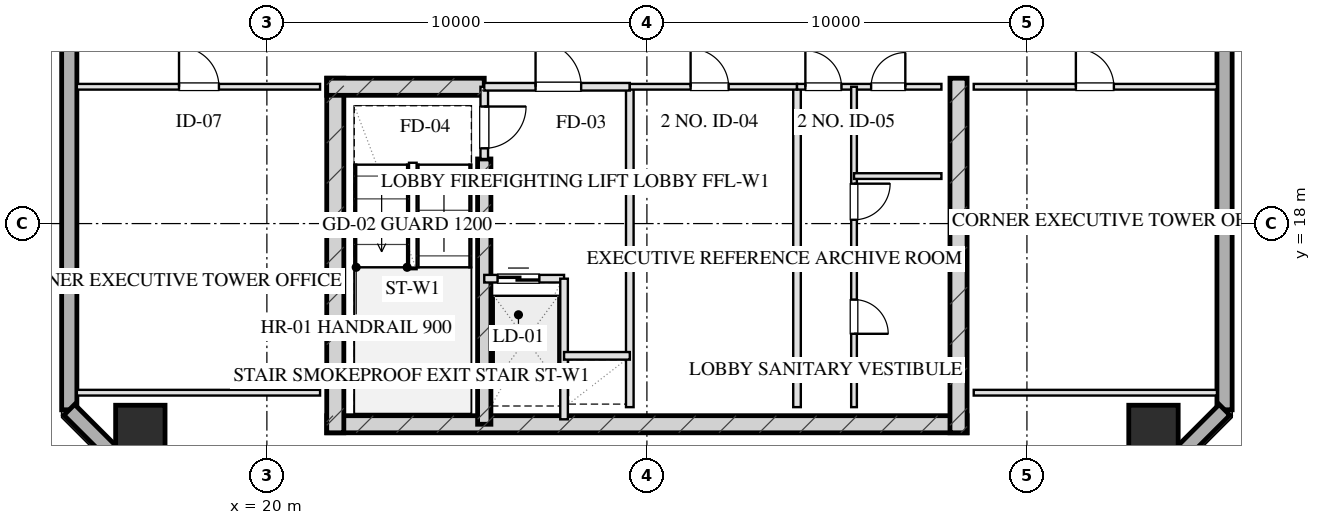
"""IFC4 building model, lengths in metres.
Left out: names, types, materials, properties, quantities, classifications, styles, units other than length and angle.
Written with IfcOpenShell. Run it as: python <this file> out.ifc"""

import sys

from ifc_helpers import new_model, si_unit, direction, frame, frame_2d, origin, origin_2d, place, context, subcontext, project, spatial, rectangle, hollow_rectangle, extrude, element, fill, save


model = new_model("IFC4")
c1 = context("Model", 3, precision=1e-05, world=origin(), true_north=direction((0.0, 1.0)))
c2 = subcontext(c1, "Body", "Model", "MODEL_VIEW")
j1 = project(units=[si_unit("LENGTHUNIT", "METRE"), si_unit("PLANEANGLEUNIT", "RADIAN")], contexts=[c1])
p1 = place(None, origin())
s1 = spatial("IfcSite", under=j1, at=p1, CompositionType="ELEMENT")
p2 = place(p1, origin())
s2 = spatial("IfcBuilding", under=s1, at=p2, CompositionType="ELEMENT")
p3 = place(p2, frame((0.0, 0.0, 226.55)))
s3 = spatial("IfcBuildingStorey", under=s2, at=p3, CompositionType="ELEMENT", Elevation=226.55)
p4 = place(p3, frame((21.575, 12.72, 0.0), z_axis=(0.0, 0.0, 1.0), x_axis=(1.0, 0.0, 0.0)))
e1 = element("IfcWall", 1, at=p4, inside=s3, PredefinedType="SHEAR", context=c2, shape_type="SweptSolid", body=[
    extrude(rectangle(XDim=16.85, YDim=0.45, at=frame_2d((8.425, 0.0))), origin(), (0.0, 0.0, 1.0), 3.45),
])
for number, where, z_axis, x_axis in (
    (2, (21.8, 21.825, 0.0), (0.0, 0.0, 1.0), (0.0, -1.0, 0.0)),
    (3, (38.2, 21.825, 0.0), (0.0, 0.0, 1.0), (0.0, -1.0, 0.0)),
):
    element("IfcWall", number, at=place(p3, frame(where, z_axis=z_axis, x_axis=x_axis)), inside=s3, PredefinedType="SHEAR", context=c2, shape_type="SweptSolid", body=[
        extrude(rectangle(XDim=9.33, YDim=0.45, at=frame_2d((4.665, 0.0))), origin(), (0.0, 0.0, 1.0), 3.45),
    ])
p5 = place(p3, frame((25.72, 19.7, 0.0), z_axis=(0.0, 0.0, 1.0), x_axis=(0.0, -1.0, 0.0)))
e4 = element("IfcWall", 4, at=p5, inside=s3, PredefinedType="SHEAR", context=c2, shape_type="SweptSolid", body=[
    extrude(rectangle(XDim=6.98, YDim=0.35, at=frame_2d((3.49, 0.0))), origin(), (0.0, 0.0, 1.0), 3.45),
])
p6 = place(p3, frame((21.575, 21.6, 0.0), z_axis=(0.0, 0.0, 1.0), x_axis=(1.0, 0.0, 0.0)))
e5 = element("IfcWall", 5, at=p6, inside=s3, PredefinedType="SHEAR", context=c2, shape_type="SweptSolid", body=[
    extrude(rectangle(XDim=4.145, YDim=0.45, at=frame_2d((2.073, 0.0))), origin(), (0.0, 0.0, 1.0), 3.45),
])
for number, where, z_axis, x_axis in (
    (6, (16.67, 12.57, 0.0), (0.0, 0.0, 1.0), (1.0, 0.0, 0.0)),
    (7, (43.33, 12.57, 0.0), (0.0, 0.0, 1.0), (1.0, 0.0, 0.0)),
):
    element("IfcColumn", number, at=place(p3, frame(where, z_axis=z_axis, x_axis=x_axis)), inside=s3, PredefinedType="COLUMN", context=c2, shape_type="SweptSolid", body=[
        extrude(hollow_rectangle(XDim=1.3, YDim=1.3, WallThickness=0.045, at=origin_2d()), origin(), (0.0, 0.0, 1.0), 3.451),
    ])
p7 = place(p3, frame((14.8, 13.1, 0.0), z_axis=(0.0, 0.0, 1.0), x_axis=(0.0, 1.0, 0.0)))
e8 = element("IfcWall", 8, at=p7, inside=s3, PredefinedType="SOLIDWALL", context=c2, shape_type="SweptSolid", body=[
    extrude(rectangle(XDim=41.8, YDim=0.4, at=frame_2d((20.9, 0.0))), origin(), (0.0, 0.0, 1.0), 2.55),
])
p8 = place(p7, frame((13.525, 0.0, 0.75)))
e9 = element("IfcOpeningElement", 9, at=p8, cuts=e8, PredefinedType="OPENING", context=c2, shape_type="SweptSolid", body=[
    extrude(rectangle(XDim=1.95, YDim=1.4, at=frame_2d((0.975, 0.7))), frame((0.0, 0.21, 0.0), z_axis=(0.0, -1.0, 0.0), x_axis=(1.0, 0.0, 0.0)), (0.0, 0.0, 1.0), 0.42),
])
p9 = place(p7, frame((17.325, 0.0, 0.75)))
e10 = element("IfcOpeningElement", 10, at=p9, cuts=e8, PredefinedType="OPENING", context=c2, shape_type="SweptSolid", body=[
    extrude(rectangle(XDim=1.95, YDim=1.4, at=frame_2d((0.975, 0.7))), frame((0.0, 0.21, 0.0), z_axis=(0.0, -1.0, 0.0), x_axis=(1.0, 0.0, 0.0)), (0.0, 0.0, 1.0), 0.42),
])
p10 = place(p7, frame((23.2, 0.0, 0.0)))
e11 = element("IfcOpeningElement", 11, at=p10, cuts=e8, PredefinedType="OPENING", context=c2, shape_type="SweptSolid", body=[
    extrude(rectangle(XDim=1.1, YDim=2.15, at=frame_2d((0.55, 1.075))), frame((0.0, 0.21, 0.0), z_axis=(0.0, -1.0, 0.0), x_axis=(1.0, 0.0, 0.0)), (0.0, 0.0, 1.0), 0.42),
])
p11 = place(p3, frame((45.2, 54.9, 0.0), z_axis=(0.0, 0.0, 1.0), x_axis=(0.0, -1.0, 0.0)))
e12 = element("IfcWall", 12, at=p11, inside=s3, PredefinedType="SOLIDWALL", context=c2, shape_type="SweptSolid", body=[
    extrude(rectangle(XDim=41.8, YDim=0.4, at=frame_2d((20.9, 0.0))), origin(), (0.0, 0.0, 1.0), 2.55),
])
p12 = place(p11, frame((26.325, 0.0, 0.75)))
e13 = element("IfcOpeningElement", 13, at=p12, cuts=e12, PredefinedType="OPENING", context=c2, shape_type="SweptSolid", body=[
    extrude(rectangle(XDim=1.95, YDim=1.4, at=frame_2d((0.975, 0.7))), frame((0.0, 0.21, 0.0), z_axis=(0.0, -1.0, 0.0), x_axis=(1.0, 0.0, 0.0)), (0.0, 0.0, 1.0), 0.42),
])
p13 = place(p11, frame((22.525, 0.0, 0.75)))
e14 = element("IfcOpeningElement", 14, at=p13, cuts=e12, PredefinedType="OPENING", context=c2, shape_type="SweptSolid", body=[
    extrude(rectangle(XDim=1.95, YDim=1.4, at=frame_2d((0.975, 0.7))), frame((0.0, 0.21, 0.0), z_axis=(0.0, -1.0, 0.0), x_axis=(1.0, 0.0, 0.0)), (0.0, 0.0, 1.0), 0.42),
])
p14 = place(p11, frame((17.5, 0.0, 0.0)))
e15 = element("IfcOpeningElement", 15, at=p14, cuts=e12, PredefinedType="OPENING", context=c2, shape_type="SweptSolid", body=[
    extrude(rectangle(XDim=1.1, YDim=2.15, at=frame_2d((0.55, 1.075))), frame((0.0, 0.21, 0.0), z_axis=(0.0, -1.0, 0.0), x_axis=(1.0, 0.0, 0.0)), (0.0, 0.0, 1.0), 0.42),
])
for number, where, z_axis, x_axis in (
    (16, (45.2, 13.1, 0.0), (0.0, 0.0, 1.0), (-0.707, -0.707, 0.0)),
    (17, (17.2, 10.7, 0.0), (0.0, 0.0, 1.0), (-0.707, 0.707, 0.0)),
):
    element("IfcWall", number, at=place(p3, frame(where, z_axis=z_axis, x_axis=x_axis)), inside=s3, PredefinedType="SOLIDWALL", context=c2, shape_type="SweptSolid", body=[
        extrude(rectangle(XDim=3.394, YDim=0.4, at=frame_2d((1.697, 0.0))), origin(), (0.0, 0.0, 1.0), 2.55),
    ])
p15 = place(p3, frame((25.72, 21.6, 0.0), z_axis=(0.0, 0.0, 1.0), x_axis=(0.0, -1.0, 0.0)))
e18 = element("IfcWall", 18, at=p15, inside=s3, PredefinedType="PARTITIONING", context=c2, shape_type="SweptSolid", body=[
    extrude(rectangle(XDim=1.9, YDim=0.2, at=frame_2d((0.95, 0.0))), origin(), (0.0, 0.0, 1.0), 3.155),
])
p16 = place(p15, frame((0.52, 0.0, 0.0)))
e19 = element("IfcOpeningElement", 19, at=p16, cuts=e18, PredefinedType="OPENING", context=c2, shape_type="SweptSolid", body=[
    extrude(rectangle(XDim=1.1, YDim=2.05, at=frame_2d((0.55, 1.025))), frame((0.0, 0.11, 0.0), z_axis=(0.0, -1.0, 0.0), x_axis=(1.0, 0.0, 0.0)), (0.0, 0.0, 1.0), 0.22),
])
p17 = place(p3, frame((29.55, 21.6, 0.0), z_axis=(0.0, 0.0, 1.0), x_axis=(0.0, -1.0, 0.0)))
e20 = element("IfcWall", 20, at=p17, inside=s3, PredefinedType="PARTITIONING", context=c2, shape_type="SweptSolid", body=[
    extrude(rectangle(XDim=8.43, YDim=0.2, at=frame_2d((4.215, 0.0))), origin(), (0.0, 0.0, 1.0), 3.155),
])
p18 = place(p3, frame((25.72, 21.6, 0.0), z_axis=(0.0, 0.0, 1.0), x_axis=(1.0, 0.0, 0.0)))
e21 = element("IfcWall", 21, at=p18, inside=s3, PredefinedType="PARTITIONING", context=c2, shape_type="SweptSolid", body=[
    extrude(rectangle(XDim=3.83, YDim=0.2, at=frame_2d((1.915, 0.0))), origin(), (0.0, 0.0, 1.0), 3.155),
])
p19 = place(p18, frame((1.35, 0.0, 0.0)))
e22 = element("IfcOpeningElement", 22, at=p19, cuts=e21, PredefinedType="OPENING", context=c2, shape_type="SweptSolid", body=[
    extrude(rectangle(XDim=1.2, YDim=2.05, at=frame_2d((0.6, 1.025))), frame((0.0, 0.11, 0.0), z_axis=(0.0, -1.0, 0.0), x_axis=(1.0, 0.0, 0.0)), (0.0, 0.0, 1.0), 0.22),
])
p20 = place(p3, frame((25.72, 16.55, 0.0), z_axis=(0.0, 0.0, 1.0), x_axis=(1.0, 0.0, 0.0)))
e23 = element("IfcWall", 23, at=p20, inside=s3, PredefinedType="PARTITIONING", context=c2, shape_type="SweptSolid", body=[
    extrude(rectangle(XDim=2.1, YDim=0.2, at=frame_2d((1.05, 0.0))), origin(), (0.0, 0.0, 1.0), 3.155),
])
p21 = place(p20, frame((0.35, 0.0, 0.0)))
e24 = element("IfcOpeningElement", 24, at=p21, cuts=e23, PredefinedType="OPENING", context=c2, shape_type="SweptSolid", body=[
    extrude(rectangle(XDim=1.1, YDim=2.05, at=frame_2d((0.55, 1.025))), frame((0.0, 0.11, 0.0), z_axis=(0.0, -1.0, 0.0), x_axis=(1.0, 0.0, 0.0)), (0.0, 0.0, 1.0), 0.22),
])
p22 = place(p3, frame((27.82, 16.55, 0.0), z_axis=(0.0, 0.0, 1.0), x_axis=(0.0, -1.0, 0.0)))
e25 = element("IfcWall", 25, at=p22, inside=s3, PredefinedType="PARTITIONING", context=c2, shape_type="SweptSolid", body=[
    extrude(rectangle(XDim=3.7, YDim=0.2, at=frame_2d((1.85, 0.0))), origin(), (0.0, 0.0, 1.0), 3.155),
])
p23 = place(p3, frame((27.82, 14.52, 0.0), z_axis=(0.0, 0.0, 1.0), x_axis=(1.0, 0.0, 0.0)))
e26 = element("IfcWall", 26, at=p23, inside=s3, PredefinedType="PARTITIONING", context=c2, shape_type="SweptSolid", body=[
    extrude(rectangle(XDim=1.73, YDim=0.2, at=frame_2d((0.865, 0.0))), origin(), (0.0, 0.0, 1.0), 3.155),
])
p24 = place(p3, frame((33.95, 21.6, 0.0), z_axis=(0.0, 0.0, 1.0), x_axis=(0.0, -1.0, 0.0)))
e27 = element("IfcWall", 27, at=p24, inside=s3, PredefinedType="PARTITIONING", context=c2, shape_type="SweptSolid", body=[
    extrude(rectangle(XDim=8.43, YDim=0.2, at=frame_2d((4.215, 0.0))), origin(), (0.0, 0.0, 1.0), 3.155),
])
p25 = place(p3, frame((29.55, 21.6, 0.0), z_axis=(0.0, 0.0, 1.0), x_axis=(1.0, 0.0, 0.0)))
e28 = element("IfcWall", 28, at=p25, inside=s3, PredefinedType="PARTITIONING", context=c2, shape_type="SweptSolid", body=[
    extrude(rectangle(XDim=4.4, YDim=0.15, at=frame_2d((2.2, 0.0))), origin(), (0.0, 0.0, 1.0), 3.155),
])
p26 = place(p25, frame((1.6, 0.0, 0.0)))
e29 = element("IfcOpeningElement", 29, at=p26, cuts=e28, PredefinedType="OPENING", context=c2, shape_type="SweptSolid", body=[
    extrude(rectangle(XDim=1.0, YDim=2.05, at=frame_2d((0.5, 1.025))), frame((0.0, 0.085, 0.0), z_axis=(0.0, -1.0, 0.0), x_axis=(1.0, 0.0, 0.0)), (0.0, 0.0, 1.0), 0.17),
])
p27 = place(p3, frame((33.95, 21.6, 0.0), z_axis=(0.0, 0.0, 1.0), x_axis=(1.0, 0.0, 0.0)))
e30 = element("IfcWall", 30, at=p27, inside=s3, PredefinedType="PARTITIONING", context=c2, shape_type="SweptSolid", body=[
    extrude(rectangle(XDim=3.8, YDim=0.15, at=frame_2d((1.9, 0.0))), origin(), (0.0, 0.0, 1.0), 3.155),
])
p28 = place(p27, frame((0.22, 0.0, 0.0)))
e31 = element("IfcOpeningElement", 31, at=p28, cuts=e30, PredefinedType="OPENING", context=c2, shape_type="SweptSolid", body=[
    extrude(rectangle(XDim=0.95, YDim=2.05, at=frame_2d((0.475, 1.025))), frame((0.0, 0.085, 0.0), z_axis=(0.0, -1.0, 0.0), x_axis=(1.0, 0.0, 0.0)), (0.0, 0.0, 1.0), 0.17),
])
p29 = place(p27, frame((1.95, 0.0, 0.0)))
e32 = element("IfcOpeningElement", 32, at=p29, cuts=e30, PredefinedType="OPENING", context=c2, shape_type="SweptSolid", body=[
    extrude(rectangle(XDim=0.9, YDim=2.05, at=frame_2d((0.45, 1.025))), frame((0.0, 0.085, 0.0), z_axis=(0.0, -1.0, 0.0), x_axis=(1.0, 0.0, 0.0)), (0.0, 0.0, 1.0), 0.17),
])
p30 = place(p3, frame((35.45, 21.6, 0.0), z_axis=(0.0, 0.0, 1.0), x_axis=(0.0, -1.0, 0.0)))
e33 = element("IfcWall", 33, at=p30, inside=s3, PredefinedType="PARTITIONING", context=c2, shape_type="SweptSolid", body=[
    extrude(rectangle(XDim=8.43, YDim=0.15, at=frame_2d((4.215, 0.0))), origin(), (0.0, 0.0, 1.0), 2.795),
])
p31 = place(p30, frame((2.55, 0.0, 0.0)))
e34 = element("IfcOpeningElement", 34, at=p31, cuts=e33, PredefinedType="OPENING", context=c2, shape_type="SweptSolid", body=[
    extrude(rectangle(XDim=0.95, YDim=2.05, at=frame_2d((0.475, 1.025))), frame((0.0, 0.085, 0.0), z_axis=(0.0, -1.0, 0.0), x_axis=(1.0, 0.0, 0.0)), (0.0, 0.0, 1.0), 0.17),
])
p32 = place(p30, frame((5.6, 0.0, 0.0)))
e35 = element("IfcOpeningElement", 35, at=p32, cuts=e33, PredefinedType="OPENING", context=c2, shape_type="SweptSolid", body=[
    extrude(rectangle(XDim=0.9, YDim=2.05, at=frame_2d((0.45, 1.025))), frame((0.0, 0.085, 0.0), z_axis=(0.0, -1.0, 0.0), x_axis=(1.0, 0.0, 0.0)), (0.0, 0.0, 1.0), 0.17),
])
for number, where, z_axis, x_axis in (
    (36, (35.45, 17.2, 0.0), (0.0, 0.0, 1.0), (1.0, 0.0, 0.0)),
    (37, (35.45, 19.25, 0.0), (0.0, 0.0, 1.0), (1.0, 0.0, 0.0)),
):
    element("IfcWall", number, at=place(p3, frame(where, z_axis=z_axis, x_axis=x_axis)), inside=s3, PredefinedType="PARTITIONING", context=c2, shape_type="SweptSolid", body=[
        extrude(rectangle(XDim=2.3, YDim=0.15, at=frame_2d((1.15, 0.0))), origin(), (0.0, 0.0, 1.0), 3.155),
    ])
p33 = place(p3, frame((15.0, 13.55, 0.0), z_axis=(0.0, 0.0, 1.0), x_axis=(1.0, 0.0, 0.0)))
e38 = element("IfcWall", 38, at=p33, inside=s3, PredefinedType="PARTITIONING", context=c2, shape_type="SweptSolid", body=[
    extrude(rectangle(XDim=6.4, YDim=0.15, at=frame_2d((3.2, 0.0))), origin(), (0.0, 0.0, 1.0), 3.155),
])
p34 = place(p3, frame((15.0, 21.6, 0.0), z_axis=(0.0, 0.0, 1.0), x_axis=(1.0, 0.0, 0.0)))
e39 = element("IfcWall", 39, at=p34, inside=s3, PredefinedType="PARTITIONING", context=c2, shape_type="SweptSolid", body=[
    extrude(rectangle(XDim=6.4, YDim=0.15, at=frame_2d((3.2, 0.0))), origin(), (0.0, 0.0, 1.0), 3.155),
])
p35 = place(p34, frame((2.688, 0.0, 0.0)))
e40 = element("IfcOpeningElement", 40, at=p35, cuts=e39, PredefinedType="OPENING", context=c2, shape_type="SweptSolid", body=[
    extrude(rectangle(XDim=1.05, YDim=2.05, at=frame_2d((0.525, 1.025))), frame((0.0, 0.085, 0.0), z_axis=(0.0, -1.0, 0.0), x_axis=(1.0, 0.0, 0.0)), (0.0, 0.0, 1.0), 0.17),
])
p36 = place(p3, frame((38.6, 13.55, 0.0), z_axis=(0.0, 0.0, 1.0), x_axis=(1.0, 0.0, 0.0)))
e41 = element("IfcWall", 41, at=p36, inside=s3, PredefinedType="PARTITIONING", context=c2, shape_type="SweptSolid", body=[
    extrude(rectangle(XDim=6.4, YDim=0.15, at=frame_2d((3.2, 0.0))), origin(), (0.0, 0.0, 1.0), 3.155),
])
p37 = place(p3, frame((38.6, 21.6, 0.0), z_axis=(0.0, 0.0, 1.0), x_axis=(1.0, 0.0, 0.0)))
e42 = element("IfcWall", 42, at=p37, inside=s3, PredefinedType="PARTITIONING", context=c2, shape_type="SweptSolid", body=[
    extrude(rectangle(XDim=6.4, YDim=0.15, at=frame_2d((3.2, 0.0))), origin(), (0.0, 0.0, 1.0), 3.155),
])
p38 = place(p37, frame((2.688, 0.0, 0.0)))
e43 = element("IfcOpeningElement", 43, at=p38, cuts=e42, PredefinedType="OPENING", context=c2, shape_type="SweptSolid", body=[
    extrude(rectangle(XDim=1.0, YDim=2.05, at=frame_2d((0.5, 1.025))), frame((0.0, 0.085, 0.0), z_axis=(0.0, -1.0, 0.0), x_axis=(1.0, 0.0, 0.0)), (0.0, 0.0, 1.0), 0.17),
])
p39 = place(p16, origin())
e44 = element("IfcDoor", 44, at=p39, inside=s3, OperationType="SINGLE_SWING_LEFT", PredefinedType="DOOR", context=c2, shape_type="SweptSolid", body=[
    extrude(rectangle(XDim=1.1, YDim=2.05, at=frame_2d((0.55, 1.025))), frame((0.0, 0.025, 0.0), z_axis=(0.0, -1.0, 0.0), x_axis=(1.0, 0.0, 0.0)), (0.0, 0.0, 1.0), 0.05),
])
fill(e19, e44)
p40 = place(p19, origin())
e45 = element("IfcDoor", 45, at=p40, inside=s3, OperationType="SINGLE_SWING_LEFT", PredefinedType="DOOR", context=c2, shape_type="SweptSolid", body=[
    extrude(rectangle(XDim=1.2, YDim=2.05, at=frame_2d((0.6, 1.025))), frame((0.0, 0.025, 0.0), z_axis=(0.0, -1.0, 0.0), x_axis=(1.0, 0.0, 0.0)), (0.0, 0.0, 1.0), 0.05),
])
fill(e22, e45)
p41 = place(p21, origin())
e46 = element("IfcDoor", 46, at=p41, inside=s3, OperationType="DOUBLE_DOOR_SLIDING", PredefinedType="DOOR", context=c2, shape_type="SweptSolid", body=[
    extrude(rectangle(XDim=1.1, YDim=2.05, at=frame_2d((0.55, 1.025))), frame((0.0, 0.025, 0.0), z_axis=(0.0, -1.0, 0.0), x_axis=(1.0, 0.0, 0.0)), (0.0, 0.0, 1.0), 0.05),
])
fill(e24, e46)
p42 = place(p26, origin())
e47 = element("IfcDoor", 47, at=p42, inside=s3, OperationType="SINGLE_SWING_LEFT", PredefinedType="DOOR", context=c2, shape_type="SweptSolid", body=[
    extrude(rectangle(XDim=1.0, YDim=2.05, at=frame_2d((0.5, 1.025))), frame((0.0, 0.025, 0.0), z_axis=(0.0, -1.0, 0.0), x_axis=(1.0, 0.0, 0.0)), (0.0, 0.0, 1.0), 0.05),
])
fill(e29, e47)
p43 = place(p28, origin())
e48 = element("IfcDoor", 48, at=p43, inside=s3, OperationType="SINGLE_SWING_LEFT", PredefinedType="DOOR", context=c2, shape_type="SweptSolid", body=[
    extrude(rectangle(XDim=0.95, YDim=2.05, at=frame_2d((0.475, 1.025))), frame((0.0, 0.025, 0.0), z_axis=(0.0, -1.0, 0.0), x_axis=(1.0, 0.0, 0.0)), (0.0, 0.0, 1.0), 0.05),
])
fill(e31, e48)
p44 = place(p29, origin())
e49 = element("IfcDoor", 49, at=p44, inside=s3, OperationType="SINGLE_SWING_RIGHT", PredefinedType="DOOR", context=c2, shape_type="SweptSolid", body=[
    extrude(rectangle(XDim=0.9, YDim=2.05, at=frame_2d((0.45, 1.025))), frame((0.0, 0.025, 0.0), z_axis=(0.0, -1.0, 0.0), x_axis=(1.0, 0.0, 0.0)), (0.0, 0.0, 1.0), 0.05),
])
fill(e32, e49)
p45 = place(p31, origin())
e50 = element("IfcDoor", 50, at=p45, inside=s3, OperationType="SINGLE_SWING_LEFT", PredefinedType="DOOR", context=c2, shape_type="SweptSolid", body=[
    extrude(rectangle(XDim=0.95, YDim=2.05, at=frame_2d((0.475, 1.025))), frame((0.0, 0.025, 0.0), z_axis=(0.0, -1.0, 0.0), x_axis=(1.0, 0.0, 0.0)), (0.0, 0.0, 1.0), 0.05),
])
fill(e34, e50)
p46 = place(p32, origin())
e51 = element("IfcDoor", 51, at=p46, inside=s3, OperationType="SINGLE_SWING_RIGHT", PredefinedType="DOOR", context=c2, shape_type="SweptSolid", body=[
    extrude(rectangle(XDim=0.9, YDim=2.05, at=frame_2d((0.45, 1.025))), frame((0.0, 0.025, 0.0), z_axis=(0.0, -1.0, 0.0), x_axis=(1.0, 0.0, 0.0)), (0.0, 0.0, 1.0), 0.05),
])
fill(e35, e51)
p47 = place(p35, origin())
e52 = element("IfcDoor", 52, at=p47, inside=s3, OperationType="SINGLE_SWING_LEFT", PredefinedType="DOOR", context=c2, shape_type="SweptSolid", body=[
    extrude(rectangle(XDim=1.05, YDim=2.05, at=frame_2d((0.525, 1.025))), frame((0.0, 0.025, 0.0), z_axis=(0.0, -1.0, 0.0), x_axis=(1.0, 0.0, 0.0)), (0.0, 0.0, 1.0), 0.05),
])
fill(e40, e52)
p48 = place(p38, origin())
e53 = element("IfcDoor", 53, at=p48, inside=s3, OperationType="SINGLE_SWING_LEFT", PredefinedType="DOOR", context=c2, shape_type="SweptSolid", body=[
    extrude(rectangle(XDim=1.0, YDim=2.05, at=frame_2d((0.5, 1.025))), frame((0.0, 0.025, 0.0), z_axis=(0.0, -1.0, 0.0), x_axis=(1.0, 0.0, 0.0)), (0.0, 0.0, 1.0), 0.05),
])
fill(e43, e53)
save(model, sys.argv[1])
